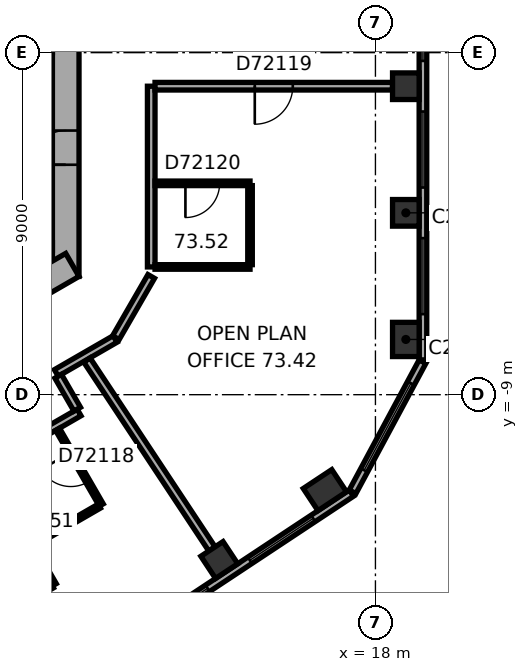
"""IFC4 building model, lengths in metres.
Left out: names, types, materials, properties, quantities, classifications, styles, units other than length and angle.
Written with IfcOpenShell. Run it as: python <this file> out.ifc"""

import sys

from ifc_helpers import new_model, si_unit, direction, frame, frame_2d, origin, origin_2d, place, context, subcontext, project, spatial, rectangle, extrude, element, fill, save


model = new_model("IFC4")
c1 = context("Model", 3, precision=1e-05, world=origin(), true_north=direction((0.0, 1.0)))
c2 = subcontext(c1, "Body", "Model", "MODEL_VIEW")
j1 = project(units=[si_unit("LENGTHUNIT", "METRE"), si_unit("PLANEANGLEUNIT", "RADIAN")], contexts=[c1])
p1 = place(None, origin())
s1 = spatial("IfcSite", under=j1, at=p1, CompositionType="ELEMENT")
p2 = place(p1, origin())
s2 = spatial("IfcBuilding", under=s1, at=p2, CompositionType="ELEMENT")
p3 = place(p2, frame((0.0, 0.0, 296.8)))
s3 = spatial("IfcBuildingStorey", under=s2, at=p3, CompositionType="ELEMENT", Elevation=296.8)
p4 = place(p3, frame((18.8, -7.547, 0.0), z_axis=(0.0, 0.0, 1.0), x_axis=(0.0, 1.0, 0.0)))
e1 = element("IfcColumn", 1, at=p4, inside=s3, PredefinedType="COLUMN", context=c2, shape_type="SweptSolid", body=[
    extrude(rectangle(XDim=0.9, YDim=0.7, at=origin_2d()), origin(), (0.0, 0.0, 1.0), 3.7),
])
for number, where, z_axis, x_axis in (
    (2, (18.8, -4.215, 0.0), (0.0, 0.0, 1.0), (0.0, 1.0, 0.0)),
    (3, (18.8, -0.883, 0.0), (0.0, 0.0, 1.0), (0.0, 1.0, 0.0)),
    (4, (13.891, -13.351, 0.0), (0.0, 0.0, 1.0), (0.834, 0.552, 0.0)),
):
    element("IfcColumn", number, at=place(p3, frame(where, z_axis=z_axis, x_axis=x_axis)), inside=s3, PredefinedType="COLUMN", context=c2, shape_type="SweptSolid", body=[
        extrude(rectangle(XDim=0.7, YDim=0.7, at=origin_2d()), origin(), (0.0, 0.0, 1.0), 3.7),
    ])
p5 = place(p3, frame((16.669, -11.512, 0.0), z_axis=(0.0, 0.0, 1.0), x_axis=(0.833885822067, 0.551936985312, 0.0)))
e5 = element("IfcColumn", 5, at=p5, inside=s3, PredefinedType="COLUMN", context=c2, shape_type="SweptSolid", body=[
    extrude(rectangle(XDim=0.9, YDim=0.7, at=origin_2d()), origin(), (0.0, 0.0, 1.0), 3.7),
])
p6 = place(p3, frame((9.85, -5.889, 0.0), z_axis=(0.0, 0.0, 1.0), x_axis=(0.0, 1.0, 0.0)))
e6 = element("IfcWall", 6, at=p6, inside=s3, PredefinedType="SHEAR", context=c2, shape_type="SweptSolid", body=[
    extrude(rectangle(XDim=11.778, YDim=0.7, at=frame_2d((5.889, 0.0))), origin(), (0.0, 0.0, 1.0), 3.7),
])
p7 = place(p6, frame((6.089, 0.0, 0.0)))
e7 = element("IfcOpeningElement", 7, at=p7, cuts=e6, PredefinedType="OPENING", context=c2, shape_type="SweptSolid", body=[
    extrude(rectangle(XDim=1.5, YDim=2.1, at=frame_2d((0.75, 1.05))), frame((0.0, 0.36, 0.0), z_axis=(0.0, -1.0, 0.0), x_axis=(1.0, 0.0, 0.0)), (0.0, 0.0, 1.0), 0.72),
])
p8 = place(p6, frame((2.939, 0.0, 0.0)))
e8 = element("IfcOpeningElement", 8, at=p8, cuts=e6, PredefinedType="OPENING", context=c2, shape_type="SweptSolid", body=[
    extrude(rectangle(XDim=0.9, YDim=2.1, at=frame_2d((0.45, 1.05))), frame((0.0, 0.36, 0.0), z_axis=(0.0, -1.0, 0.0), x_axis=(1.0, 0.0, 0.0)), (0.0, 0.0, 1.0), 0.72),
])
p9 = place(p3, frame((-0.175, -11.475, 0.0), z_axis=(0.0, 0.0, 1.0), x_axis=(0.866026453023, 0.499998182661, 0.0)))
e9 = element("IfcWall", 9, at=p9, inside=s3, PredefinedType="SHEAR", context=c2, shape_type="SweptSolid", body=[
    extrude(rectangle(XDim=11.778, YDim=0.7, at=frame_2d((5.889, 0.0))), origin(), (0.0, 0.0, 1.0), 3.7),
])
p10 = place(p9, frame((2.439, 0.0, 0.0)))
e10 = element("IfcOpeningElement", 10, at=p10, cuts=e9, PredefinedType="OPENING", context=c2, shape_type="SweptSolid", body=[
    extrude(rectangle(XDim=1.1, YDim=2.1, at=frame_2d((0.55, 1.05))), frame((0.0, 0.36, 0.0), z_axis=(0.0, -1.0, 0.0), x_axis=(1.0, 0.0, 0.0)), (0.0, 0.0, 1.0), 0.72),
])
p11 = place(p9, frame((5.039, 0.0, 0.0)))
e11 = element("IfcOpeningElement", 11, at=p11, cuts=e9, PredefinedType="OPENING", context=c2, shape_type="SweptSolid", body=[
    extrude(rectangle(XDim=1.1, YDim=2.1, at=frame_2d((0.55, 1.05))), frame((0.0, 0.36, 0.0), z_axis=(0.0, -1.0, 0.0), x_axis=(1.0, 0.0, 0.0)), (0.0, 0.0, 1.0), 0.72),
])
p12 = place(p9, frame((7.639, 0.0, 0.0)))
e12 = element("IfcOpeningElement", 12, at=p12, cuts=e9, PredefinedType="OPENING", context=c2, shape_type="SweptSolid", body=[
    extrude(rectangle(XDim=1.1, YDim=2.1, at=frame_2d((0.55, 1.05))), frame((0.0, 0.36, 0.0), z_axis=(0.0, -1.0, 0.0), x_axis=(1.0, 0.0, 0.0)), (0.0, 0.0, 1.0), 0.72),
])
p13 = place(p3, frame((19.25, -8.084, 0.0), z_axis=(0.0, 0.0, 1.0), x_axis=(0.0, 1.0, 0.0)))
e13 = element("IfcWall", 13, at=p13, inside=s3, PredefinedType="STANDARD", context=c2, shape_type="SweptSolid", body=[
    extrude(rectangle(XDim=17.731, YDim=0.2, at=frame_2d((8.866, 0.0))), origin(), (0.0, 0.0, 1.0), 3.7),
])
p14 = place(p13, frame((1.203, 0.0, 0.9)))
e14 = element("IfcOpeningElement", 14, at=p14, cuts=e13, PredefinedType="OPENING", context=c2, shape_type="SweptSolid", body=[
    extrude(rectangle(XDim=2.0, YDim=2.0, at=frame_2d((1.0, 1.0))), frame((0.0, 0.11, 0.0), z_axis=(0.0, -1.0, 0.0), x_axis=(1.0, 0.0, 0.0)), (0.0, 0.0, 1.0), 0.22),
])
p15 = place(p13, frame((4.535, 0.0, 0.9)))
e15 = element("IfcOpeningElement", 15, at=p15, cuts=e13, PredefinedType="OPENING", context=c2, shape_type="SweptSolid", body=[
    extrude(rectangle(XDim=2.0, YDim=2.0, at=frame_2d((1.0, 1.0))), frame((0.0, 0.11, 0.0), z_axis=(0.0, -1.0, 0.0), x_axis=(1.0, 0.0, 0.0)), (0.0, 0.0, 1.0), 0.22),
])
p16 = place(p13, frame((7.866, 0.0, 0.9)))
e16 = element("IfcOpeningElement", 16, at=p16, cuts=e13, PredefinedType="OPENING", context=c2, shape_type="SweptSolid", body=[
    extrude(rectangle(XDim=2.0, YDim=2.0, at=frame_2d((1.0, 1.0))), frame((0.0, 0.11, 0.0), z_axis=(0.0, -1.0, 0.0), x_axis=(1.0, 0.0, 0.0)), (0.0, 0.0, 1.0), 0.22),
])
p17 = place(p13, frame((11.198, 0.0, 0.9)))
e17 = element("IfcOpeningElement", 17, at=p17, cuts=e13, PredefinedType="OPENING", context=c2, shape_type="SweptSolid", body=[
    extrude(rectangle(XDim=2.0, YDim=2.0, at=frame_2d((1.0, 1.0))), frame((0.0, 0.11, 0.0), z_axis=(0.0, -1.0, 0.0), x_axis=(1.0, 0.0, 0.0)), (0.0, 0.0, 1.0), 0.22),
])
p18 = place(p13, frame((14.53, 0.0, 0.9)))
e18 = element("IfcOpeningElement", 18, at=p18, cuts=e13, PredefinedType="OPENING", context=c2, shape_type="SweptSolid", body=[
    extrude(rectangle(XDim=2.0, YDim=2.0, at=frame_2d((1.0, 1.0))), frame((0.0, 0.11, 0.0), z_axis=(0.0, -1.0, 0.0), x_axis=(1.0, 0.0, 0.0)), (0.0, 0.0, 1.0), 0.22),
])
p19 = place(p3, frame((2.58, -21.377, 0.0), z_axis=(0.0, 0.0, 1.0), x_axis=(0.833888592176, 0.551932800112, 0.0)))
e19 = element("IfcWall", 19, at=p19, inside=s3, PredefinedType="STANDARD", context=c2, shape_type="SweptSolid", body=[
    extrude(rectangle(XDim=17.731, YDim=0.2, at=frame_2d((8.866, 0.0))), origin(), (0.0, 0.0, 1.0), 3.7),
])
p20 = place(p19, frame((1.202, 0.0, 0.9)))
e20 = element("IfcOpeningElement", 20, at=p20, cuts=e19, PredefinedType="OPENING", context=c2, shape_type="SweptSolid", body=[
    extrude(rectangle(XDim=2.0, YDim=2.0, at=frame_2d((1.0, 1.0))), frame((0.0, 0.11, 0.0), z_axis=(0.0, -1.0, 0.0), x_axis=(1.0, 0.0, 0.0)), (0.0, 0.0, 1.0), 0.22),
])
p21 = place(p19, frame((4.533, 0.0, 0.9)))
e21 = element("IfcOpeningElement", 21, at=p21, cuts=e19, PredefinedType="OPENING", context=c2, shape_type="SweptSolid", body=[
    extrude(rectangle(XDim=2.0, YDim=2.0, at=frame_2d((1.0, 1.0))), frame((0.0, 0.11, 0.0), z_axis=(0.0, -1.0, 0.0), x_axis=(1.0, 0.0, 0.0)), (0.0, 0.0, 1.0), 0.22),
])
p22 = place(p19, frame((7.865, 0.0, 0.9)))
e22 = element("IfcOpeningElement", 22, at=p22, cuts=e19, PredefinedType="OPENING", context=c2, shape_type="SweptSolid", body=[
    extrude(rectangle(XDim=2.0, YDim=2.0, at=frame_2d((1.0, 1.0))), frame((0.0, 0.11, 0.0), z_axis=(0.0, -1.0, 0.0), x_axis=(1.0, 0.0, 0.0)), (0.0, 0.0, 1.0), 0.22),
])
p23 = place(p19, frame((11.197, 0.0, 0.9)))
e23 = element("IfcOpeningElement", 23, at=p23, cuts=e19, PredefinedType="OPENING", context=c2, shape_type="SweptSolid", body=[
    extrude(rectangle(XDim=2.0, YDim=2.0, at=frame_2d((1.0, 1.0))), frame((0.0, 0.11, 0.0), z_axis=(0.0, -1.0, 0.0), x_axis=(1.0, 0.0, 0.0)), (0.0, 0.0, 1.0), 0.22),
])
p24 = place(p19, frame((14.528, 0.0, 0.9)))
e24 = element("IfcOpeningElement", 24, at=p24, cuts=e19, PredefinedType="OPENING", context=c2, shape_type="SweptSolid", body=[
    extrude(rectangle(XDim=2.0, YDim=2.0, at=frame_2d((1.0, 1.0))), frame((0.0, 0.11, 0.0), z_axis=(0.0, -1.0, 0.0), x_axis=(1.0, 0.0, 0.0)), (0.0, 0.0, 1.0), 0.22),
])
p25 = place(p3, frame((17.399, -11.554, 0.0), z_axis=(0.0, 0.0, 1.0), x_axis=(0.473309051311, 0.880896442238, 0.0)))
e25 = element("IfcWall", 25, at=p25, inside=s3, PredefinedType="STANDARD", context=c2, shape_type="SweptSolid", body=[
    extrude(rectangle(XDim=3.886, YDim=0.2, at=frame_2d((1.943, 0.0))), origin(), (0.0, 0.0, 1.0), 3.7),
])
p26 = place(p25, frame((0.643, 0.0, 0.9)))
e26 = element("IfcOpeningElement", 26, at=p26, cuts=e25, PredefinedType="OPENING", context=c2, shape_type="SweptSolid", body=[
    extrude(rectangle(XDim=2.6, YDim=2.0, at=frame_2d((1.3, 1.0))), frame((0.0, 0.11, 0.0), z_axis=(0.0, -1.0, 0.0), x_axis=(1.0, 0.0, 0.0)), (0.0, 0.0, 1.0), 0.22),
])
for number, where, z_axis, x_axis in (
    (27, (7.3, -5.1, 0.0), (0.0, 0.0, 1.0), (1.0, 0.0, 0.0)),
    (28, (7.3, 0.1, 0.0), (0.0, 0.0, 1.0), (1.0, 0.0, 0.0)),
):
    element("IfcWall", number, at=place(p3, frame(where, z_axis=z_axis, x_axis=x_axis)), inside=s3, PredefinedType="PARTITIONING", context=c2, shape_type="SweptSolid", body=[
        extrude(rectangle(XDim=2.2, YDim=0.2, at=frame_2d((1.1, 0.0))), origin(), (0.0, 0.0, 1.0), 3.35),
    ])
p27 = place(p3, frame((7.8, -10.971, 0.0), z_axis=(0.0, 0.0, 1.0), x_axis=(0.500010275428, -0.866019471182, 0.0)))
e29 = element("IfcWall", 29, at=p27, inside=s3, PredefinedType="PARTITIONING", context=c2, shape_type="SweptSolid", body=[
    extrude(rectangle(XDim=3.5, YDim=0.12, at=frame_2d((1.75, 0.0))), origin(), (0.0, 0.0, 1.0), 3.35),
])
p28 = place(p3, frame((7.854, -10.824, 0.0), z_axis=(0.0, 0.0, 1.0), x_axis=(0.866029675718, 0.499992600721, 0.0)))
e30 = element("IfcWall", 30, at=p28, inside=s3, PredefinedType="PARTITIONING", context=c2, shape_type="SweptSolid", body=[
    extrude(rectangle(XDim=2.712, YDim=0.2, at=frame_2d((1.356, 0.0))), origin(), (0.0, 0.0, 1.0), 3.35),
])
p29 = place(p3, frame((9.498, -14.032, 0.0), z_axis=(0.0, 0.0, 1.0), x_axis=(-0.866040564224, -0.499973740429, 0.0)))
e31 = element("IfcWall", 31, at=p29, inside=s3, PredefinedType="PARTITIONING", context=c2, shape_type="SweptSolid", body=[
    extrude(rectangle(XDim=3.28, YDim=0.12, at=frame_2d((1.64, 0.0))), origin(), (0.0, 0.0, 1.0), 3.35),
])
p30 = place(p29, frame((1.19, 0.0, 0.0)))
e32 = element("IfcOpeningElement", 32, at=p30, cuts=e31, PredefinedType="OPENING", context=c2, shape_type="SweptSolid", body=[
    extrude(rectangle(XDim=0.9, YDim=2.1, at=frame_2d((0.45, 1.05))), frame((0.0, 0.07, 0.0), z_axis=(0.0, -1.0, 0.0), x_axis=(1.0, 0.0, 0.0)), (0.0, 0.0, 1.0), 0.14),
])
p31 = place(p3, frame((9.602, -8.428, 0.0), z_axis=(0.0, 0.0, 1.0), x_axis=(0.865999114786, 0.500045531117, 0.0)))
e33 = element("IfcWall", 33, at=p31, inside=s3, PredefinedType="PARTITIONING", context=c2, shape_type="SweptSolid", body=[
    extrude(rectangle(XDim=1.788, YDim=0.2, at=frame_2d((0.894, 0.0))), origin(), (0.0, 0.0, 1.0), 3.35),
])
p32 = place(p3, frame((9.635, -9.911, 0.0), z_axis=(0.0, 0.0, 1.0), x_axis=(0.499952165731, -0.866053019151, 0.0)))
e34 = element("IfcWall", 34, at=p32, inside=s3, PredefinedType="PARTITIONING", context=c2, shape_type="SweptSolid", body=[
    extrude(rectangle(XDim=2.3, YDim=0.12, at=frame_2d((1.15, 0.0))), origin(), (0.0, 0.0, 1.0), 3.35),
])
p33 = place(p32, frame((0.7, 0.0, 0.0)))
e35 = element("IfcOpeningElement", 35, at=p33, cuts=e34, PredefinedType="OPENING", context=c2, shape_type="SweptSolid", body=[
    extrude(rectangle(XDim=0.9, YDim=2.1, at=frame_2d((0.45, 1.05))), frame((0.0, 0.07, 0.0), z_axis=(0.0, -1.0, 0.0), x_axis=(1.0, 0.0, 0.0)), (0.0, 0.0, 1.0), 0.14),
])
p34 = place(p3, frame((10.152, -9.382, 0.0), z_axis=(0.0, 0.0, 1.0), x_axis=(-0.499968756647, 0.866043441391, 0.0)))
e36 = element("IfcWall", 36, at=p34, inside=s3, PredefinedType="PARTITIONING", context=c2, shape_type="SweptSolid", body=[
    extrude(rectangle(XDim=1.001, YDim=0.2, at=frame_2d((0.5, 0.0))), origin(), (0.0, 0.0, 1.0), 3.35),
])
p35 = place(p3, frame((10.733, -11.933, 0.0), z_axis=(0.0, 0.0, 1.0), x_axis=(-0.866012558475, -0.500022248069, 0.0)))
e37 = element("IfcWall", 37, at=p35, inside=s3, PredefinedType="PARTITIONING", context=c2, shape_type="SweptSolid", body=[
    extrude(rectangle(XDim=1.88, YDim=0.12, at=frame_2d((0.94, 0.0))), origin(), (0.0, 0.0, 1.0), 3.35),
])
p36 = place(p3, frame((11.17, -7.5, 0.0), z_axis=(0.0, 0.0, 1.0), x_axis=(0.500006454166, 0.866021677438, 0.0)))
e38 = element("IfcWall", 38, at=p36, inside=s3, PredefinedType="PARTITIONING", context=c2, shape_type="SweptSolid", body=[
    extrude(rectangle(XDim=1.86, YDim=0.2, at=frame_2d((0.93, 0.0))), origin(), (0.0, 0.0, 1.0), 3.35),
])
p37 = place(p3, frame((12.1, -5.639, 0.0), z_axis=(0.0, 0.0, 1.0), x_axis=(0.0, 1.0, 0.0)))
e39 = element("IfcWall", 39, at=p37, inside=s3, PredefinedType="PARTITIONING", context=c2, shape_type="SweptSolid", body=[
    extrude(rectangle(XDim=4.756, YDim=0.2, at=frame_2d((2.378, 0.0))), origin(), (0.0, 0.0, 1.0), 3.35),
])
p38 = place(p3, frame((12.2, -3.439, 0.0), z_axis=(0.0, 0.0, 1.0), x_axis=(1.0, 0.0, 0.0)))
e40 = element("IfcWall", 40, at=p38, inside=s3, PredefinedType="PARTITIONING", context=c2, shape_type="SweptSolid", body=[
    extrude(rectangle(XDim=2.5, YDim=0.12, at=frame_2d((1.25, 0.0))), origin(), (0.0, 0.0, 1.0), 3.35),
])
p39 = place(p38, frame((0.8, 0.0, 0.0)))
e41 = element("IfcOpeningElement", 41, at=p39, cuts=e40, PredefinedType="OPENING", context=c2, shape_type="SweptSolid", body=[
    extrude(rectangle(XDim=0.9, YDim=2.1, at=frame_2d((0.45, 1.05))), frame((0.0, 0.07, 0.0), z_axis=(0.0, -1.0, 0.0), x_axis=(1.0, 0.0, 0.0)), (0.0, 0.0, 1.0), 0.14),
])
p40 = place(p3, frame((12.2, -0.883, 0.0), z_axis=(0.0, 0.0, 1.0), x_axis=(1.0, 0.0, 0.0)))
e42 = element("IfcWall", 42, at=p40, inside=s3, PredefinedType="PARTITIONING", context=c2, shape_type="SweptSolid", body=[
    extrude(rectangle(XDim=6.25, YDim=0.2, at=frame_2d((3.125, 0.0))), origin(), (0.0, 0.0, 1.0), 2.65),
])
p41 = place(p40, frame((2.625, 0.0, 0.0)))
e43 = element("IfcOpeningElement", 43, at=p41, cuts=e42, PredefinedType="OPENING", context=c2, shape_type="SweptSolid", body=[
    extrude(rectangle(XDim=1.0, YDim=2.1, at=frame_2d((0.5, 1.05))), frame((0.0, 0.11, 0.0), z_axis=(0.0, -1.0, 0.0), x_axis=(1.0, 0.0, 0.0)), (0.0, 0.0, 1.0), 0.22),
])
p42 = place(p3, frame((13.698, -13.059, 0.0), z_axis=(0.0, 0.0, 1.0), x_axis=(-0.551927229301, 0.833892279348, 0.0)))
e44 = element("IfcWall", 44, at=p42, inside=s3, PredefinedType="PARTITIONING", context=c2, shape_type="SweptSolid", body=[
    extrude(rectangle(XDim=5.96, YDim=0.2, at=frame_2d((2.98, 0.0))), origin(), (0.0, 0.0, 1.0), 2.65),
])
p43 = place(p3, frame((14.7, -5.639, 0.0), z_axis=(0.0, 0.0, 1.0), x_axis=(-1.0, 0.0, 0.0)))
e45 = element("IfcWall", 45, at=p43, inside=s3, PredefinedType="PARTITIONING", context=c2, shape_type="SweptSolid", body=[
    extrude(rectangle(XDim=2.5, YDim=0.12, at=frame_2d((1.25, 0.0))), origin(), (0.0, 0.0, 1.0), 3.35),
])
p44 = place(p3, frame((14.7, -3.499, 0.0), z_axis=(0.0, 0.0, 1.0), x_axis=(0.0, -1.0, 0.0)))
e46 = element("IfcWall", 46, at=p44, inside=s3, PredefinedType="PARTITIONING", context=c2, shape_type="SweptSolid", body=[
    extrude(rectangle(XDim=2.08, YDim=0.12, at=frame_2d((1.04, 0.0))), origin(), (0.0, 0.0, 1.0), 3.35),
])
p45 = place(p14, origin())
e47 = element("IfcWindow", 47, at=p45, inside=s3, PartitioningType="SINGLE_PANEL", PredefinedType="WINDOW", context=c2, shape_type="SweptSolid", body=[
    extrude(rectangle(XDim=2.0, YDim=2.0, at=frame_2d((1.0, 1.0))), frame((0.0, 0.03, 0.0), z_axis=(0.0, -1.0, 0.0), x_axis=(1.0, 0.0, 0.0)), (0.0, 0.0, 1.0), 0.06),
])
fill(e14, e47)
p46 = place(p15, origin())
e48 = element("IfcWindow", 48, at=p46, inside=s3, PartitioningType="SINGLE_PANEL", PredefinedType="WINDOW", context=c2, shape_type="SweptSolid", body=[
    extrude(rectangle(XDim=2.0, YDim=2.0, at=frame_2d((1.0, 1.0))), frame((0.0, 0.03, 0.0), z_axis=(0.0, -1.0, 0.0), x_axis=(1.0, 0.0, 0.0)), (0.0, 0.0, 1.0), 0.06),
])
fill(e15, e48)
p47 = place(p16, origin())
e49 = element("IfcWindow", 49, at=p47, inside=s3, PartitioningType="SINGLE_PANEL", PredefinedType="WINDOW", context=c2, shape_type="SweptSolid", body=[
    extrude(rectangle(XDim=2.0, YDim=2.0, at=frame_2d((1.0, 1.0))), frame((0.0, 0.03, 0.0), z_axis=(0.0, -1.0, 0.0), x_axis=(1.0, 0.0, 0.0)), (0.0, 0.0, 1.0), 0.06),
])
fill(e16, e49)
p48 = place(p23, origin())
e50 = element("IfcWindow", 50, at=p48, inside=s3, PartitioningType="SINGLE_PANEL", PredefinedType="WINDOW", context=c2, shape_type="SweptSolid", body=[
    extrude(rectangle(XDim=2.0, YDim=2.0, at=frame_2d((1.0, 1.0))), frame((0.0, 0.03, 0.0), z_axis=(0.0, -1.0, 0.0), x_axis=(1.0, 0.0, 0.0)), (0.0, 0.0, 1.0), 0.06),
])
fill(e23, e50)
p49 = place(p24, origin())
e51 = element("IfcWindow", 51, at=p49, inside=s3, PartitioningType="SINGLE_PANEL", PredefinedType="WINDOW", context=c2, shape_type="SweptSolid", body=[
    extrude(rectangle(XDim=2.0, YDim=2.0, at=frame_2d((1.0, 1.0))), frame((0.0, 0.03, 0.0), z_axis=(0.0, -1.0, 0.0), x_axis=(1.0, 0.0, 0.0)), (0.0, 0.0, 1.0), 0.06),
])
fill(e24, e51)
p50 = place(p26, origin())
e52 = element("IfcWindow", 52, at=p50, inside=s3, PartitioningType="SINGLE_PANEL", PredefinedType="WINDOW", context=c2, shape_type="SweptSolid", body=[
    extrude(rectangle(XDim=2.6, YDim=2.0, at=frame_2d((1.3, 1.0))), frame((0.0, 0.03, 0.0), z_axis=(0.0, -1.0, 0.0), x_axis=(1.0, 0.0, 0.0)), (0.0, 0.0, 1.0), 0.06),
])
fill(e26, e52)
p51 = place(p8, origin())
e53 = element("IfcDoor", 53, at=p51, inside=s3, OperationType="SINGLE_SWING_LEFT", PredefinedType="DOOR", context=c2, shape_type="SweptSolid", body=[
    extrude(rectangle(XDim=0.9, YDim=2.1, at=frame_2d((0.45, 1.05))), frame((0.0, 0.025, 0.0), z_axis=(0.0, -1.0, 0.0), x_axis=(1.0, 0.0, 0.0)), (0.0, 0.0, 1.0), 0.05),
])
fill(e8, e53)
p52 = place(p33, origin())
e54 = element("IfcDoor", 54, at=p52, inside=s3, OperationType="SINGLE_SWING_LEFT", PredefinedType="DOOR", context=c2, shape_type="SweptSolid", body=[
    extrude(rectangle(XDim=0.9, YDim=2.1, at=frame_2d((0.45, 1.05))), frame((0.0, 0.025, 0.0), z_axis=(0.0, -1.0, 0.0), x_axis=(1.0, 0.0, 0.0)), (0.0, 0.0, 1.0), 0.05),
])
fill(e35, e54)
p53 = place(p41, origin())
e55 = element("IfcDoor", 55, at=p53, inside=s3, OperationType="SINGLE_SWING_LEFT", PredefinedType="DOOR", context=c2, shape_type="SweptSolid", body=[
    extrude(rectangle(XDim=1.0, YDim=2.1, at=frame_2d((0.5, 1.05))), frame((0.0, 0.025, 0.0), z_axis=(0.0, -1.0, 0.0), x_axis=(1.0, 0.0, 0.0)), (0.0, 0.0, 1.0), 0.05),
])
fill(e43, e55)
p54 = place(p39, origin())
e56 = element("IfcDoor", 56, at=p54, inside=s3, OperationType="SINGLE_SWING_LEFT", PredefinedType="DOOR", context=c2, shape_type="SweptSolid", body=[
    extrude(rectangle(XDim=0.9, YDim=2.1, at=frame_2d((0.45, 1.05))), frame((0.0, 0.025, 0.0), z_axis=(0.0, -1.0, 0.0), x_axis=(1.0, 0.0, 0.0)), (0.0, 0.0, 1.0), 0.05),
])
fill(e41, e56)
save(model, sys.argv[1])
